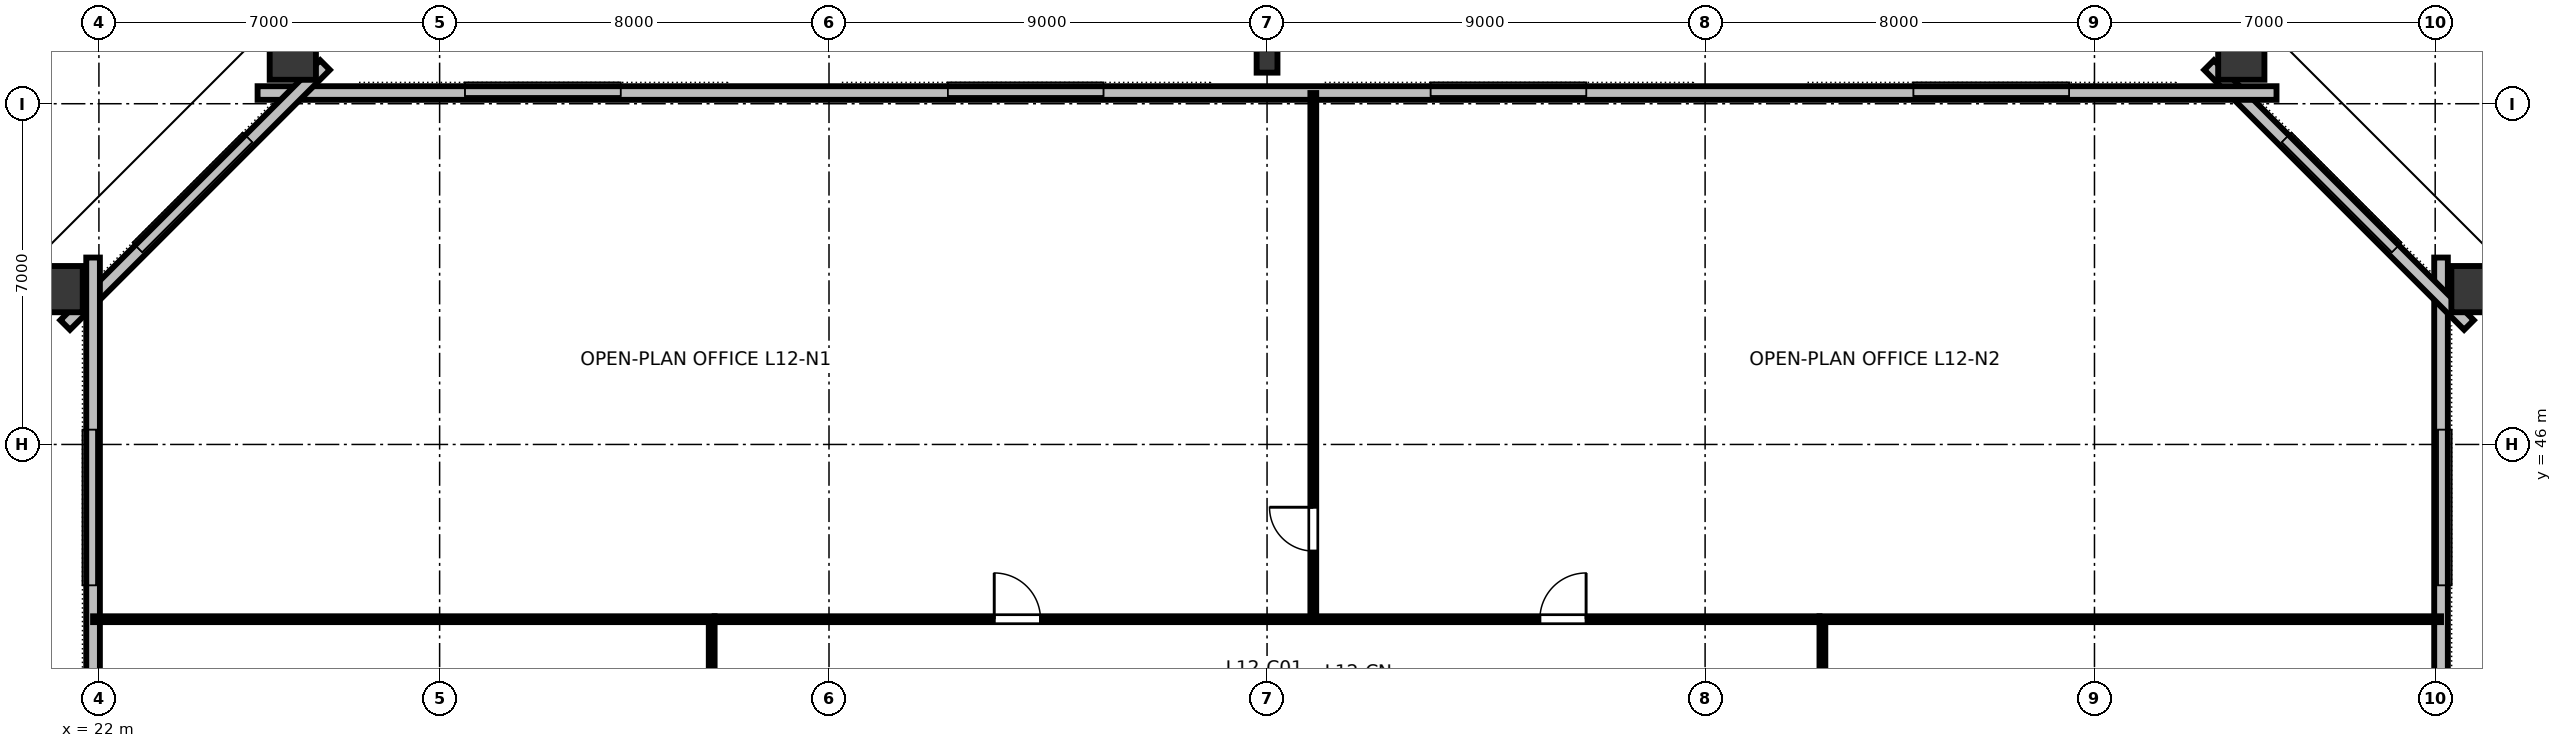
"""IFC4 building model, lengths in metres.
Left out: names, types, materials, properties, quantities, classifications, styles, units other than length and angle.
Written with IfcOpenShell. Run it as: python <this file> out.ifc"""

import sys

from ifc_helpers import new_model, si_unit, direction, frame, frame_2d, origin, origin_2d, place, context, subcontext, project, spatial, rectangle, hollow_rectangle, i_section, extrude, element, fill, save


model = new_model("IFC4")
c1 = context("Model", 3, precision=1e-05, world=origin(), true_north=direction((0.0, 1.0)))
c2 = subcontext(c1, "Body", "Model", "MODEL_VIEW")
j1 = project(units=[si_unit("LENGTHUNIT", "METRE"), si_unit("PLANEANGLEUNIT", "RADIAN")], contexts=[c1])
p1 = place(None, origin())
s1 = spatial("IfcSite", under=j1, at=p1, CompositionType="ELEMENT")
p2 = place(p1, origin())
s2 = spatial("IfcBuilding", under=s1, at=p2, CompositionType="ELEMENT")
p3 = place(p2, frame((0.0, 0.0, 49.6)))
s3 = spatial("IfcBuildingStorey", under=s2, at=p3, CompositionType="ELEMENT", Elevation=49.6)
for number, where, z_axis, x_axis in (
    (1, (70.907, 49.191, 0.0), (0.0, 0.0, 1.0), (0.0, 1.0, 0.0)),
    (2, (66.016, 54.067, 0.0), (0.0, 0.0, 1.0), (1.0, 0.0, 0.0)),
):
    element("IfcColumn", number, at=place(p3, frame(where, z_axis=z_axis, x_axis=x_axis)), inside=s3, PredefinedType="COLUMN", context=c2, shape_type="SweptSolid", body=[
        extrude(hollow_rectangle(XDim=0.95, YDim=1.15, WallThickness=0.06, at=origin_2d()), origin(), (0.0, 0.0, 1.0), 3.358),
    ])
p4 = place(p3, frame((46.0, 53.88, 0.0), z_axis=(0.0, 0.0, 1.0), x_axis=(1.0, 0.0, 0.0)))
e3 = element("IfcColumn", 3, at=p4, inside=s3, PredefinedType="COLUMN", context=c2, shape_type="SweptSolid", body=[
    extrude(i_section(OverallWidth=0.428, OverallDepth=0.483, WebThickness=0.051, FlangeThickness=0.082, FilletRadius=0.025, at=origin_2d()), origin(), (0.0, 0.0, 1.0), 3.358),
])
for number, where, z_axis, x_axis in (
    (4, (25.984, 54.067, 0.0), (0.0, 0.0, 1.0), (1.0, 0.0, 0.0)),
    (5, (21.093, 49.191, 0.0), (0.0, 0.0, 1.0), (0.0, 1.0, 0.0)),
):
    element("IfcColumn", number, at=place(p3, frame(where, z_axis=z_axis, x_axis=x_axis)), inside=s3, PredefinedType="COLUMN", context=c2, shape_type="SweptSolid", body=[
        extrude(hollow_rectangle(XDim=0.95, YDim=1.15, WallThickness=0.06, at=origin_2d()), origin(), (0.0, 0.0, 1.0), 3.358),
    ])
p5 = place(p3, frame((70.12, 14.16, 0.0), z_axis=(0.0, 0.0, 1.0), x_axis=(0.0, 1.0, 0.0)))
e6 = element("IfcWall", 6, at=p5, inside=s3, PredefinedType="STANDARD", context=c2, shape_type="SweptSolid", body=[
    extrude(rectangle(XDim=35.68, YDim=0.28, at=frame_2d((17.84, 0.0))), origin(), (0.0, 0.0, 1.0), 3.36),
])
p6 = place(p3, frame((70.694, 48.455, 0.0), z_axis=(0.0, 0.0, 1.0), x_axis=(-0.707106781187, 0.707106781187, 0.0)))
e7 = element("IfcWall", 7, at=p6, inside=s3, PredefinedType="STANDARD", context=c2, shape_type="SweptSolid", body=[
    extrude(rectangle(XDim=7.551, YDim=0.28, at=frame_2d((3.775, 0.0))), origin(), (0.0, 0.0, 1.0), 3.36),
])
p7 = place(p3, frame((66.74, 53.22, 0.0), z_axis=(0.0, 0.0, 1.0), x_axis=(-1.0, 0.0, 0.0)))
e8 = element("IfcWall", 8, at=p7, inside=s3, PredefinedType="STANDARD", context=c2, shape_type="SweptSolid", body=[
    extrude(rectangle(XDim=41.48, YDim=0.28, at=frame_2d((20.74, 0.0))), origin(), (0.0, 0.0, 1.0), 3.36),
])
p8 = place(p3, frame((26.646, 53.794, 0.0), z_axis=(0.0, 0.0, 1.0), x_axis=(-0.707106781187, -0.707106781187, 0.0)))
e9 = element("IfcWall", 9, at=p8, inside=s3, PredefinedType="STANDARD", context=c2, shape_type="SweptSolid", body=[
    extrude(rectangle(XDim=7.551, YDim=0.28, at=frame_2d((3.775, 0.0))), origin(), (0.0, 0.0, 1.0), 3.36),
])
p9 = place(p3, frame((21.88, 49.84, 0.0), z_axis=(0.0, 0.0, 1.0), x_axis=(0.0, -1.0, 0.0)))
e10 = element("IfcWall", 10, at=p9, inside=s3, PredefinedType="STANDARD", context=c2, shape_type="SweptSolid", body=[
    extrude(rectangle(XDim=35.68, YDim=0.28, at=frame_2d((17.84, 0.0))), origin(), (0.0, 0.0, 1.0), 3.36),
])
p10 = place(p3, frame((46.95, 42.41, 0.0), z_axis=(0.0, 0.0, 1.0), x_axis=(0.0, 1.0, 0.0)))
e11 = element("IfcWall", 11, at=p10, inside=s3, PredefinedType="PARTITIONING", context=c2, shape_type="SweptSolid", body=[
    extrude(rectangle(XDim=10.81, YDim=0.12, at=frame_2d((5.405, 0.0))), origin(), (0.0, 0.0, 1.0), 2.64),
])
p11 = place(p10, frame((1.4, 0.0, 0.0)))
e12 = element("IfcOpeningElement", 12, at=p11, cuts=e11, PredefinedType="OPENING", context=c2, shape_type="SweptSolid", body=[
    extrude(rectangle(XDim=0.9, YDim=2.15, at=frame_2d((0.45, 1.075))), frame((0.0, 0.07, 0.0), z_axis=(0.0, -1.0, 0.0), x_axis=(1.0, 0.0, 0.0)), (0.0, 0.0, 1.0), 0.14),
])
p12 = place(p3, frame((34.65, 42.41, 0.0), z_axis=(0.0, 0.0, 1.0), x_axis=(1.0, 0.0, 0.0)))
e13 = element("IfcWall", 13, at=p12, inside=s3, PredefinedType="PARTITIONING", context=c2, shape_type="SweptSolid", body=[
    extrude(rectangle(XDim=22.7, YDim=0.12, at=frame_2d((11.35, 0.0))), origin(), (0.0, 0.0, 1.0), 2.64),
])
p13 = place(p12, frame((5.745, 0.0, 0.0)))
e14 = element("IfcOpeningElement", 14, at=p13, cuts=e13, PredefinedType="OPENING", context=c2, shape_type="SweptSolid", body=[
    extrude(rectangle(XDim=0.95, YDim=2.15, at=frame_2d((0.475, 1.075))), frame((0.0, 0.07, 0.0), z_axis=(0.0, -1.0, 0.0), x_axis=(1.0, 0.0, 0.0)), (0.0, 0.0, 1.0), 0.14),
])
p14 = place(p12, frame((16.955, 0.0, 0.0)))
e15 = element("IfcOpeningElement", 15, at=p14, cuts=e13, PredefinedType="OPENING", context=c2, shape_type="SweptSolid", body=[
    extrude(rectangle(XDim=0.95, YDim=2.15, at=frame_2d((0.475, 1.075))), frame((0.0, 0.07, 0.0), z_axis=(0.0, -1.0, 0.0), x_axis=(1.0, 0.0, 0.0)), (0.0, 0.0, 1.0), 0.14),
])
p15 = place(p3, frame((34.59, 21.65, 0.0), z_axis=(0.0, 0.0, 1.0), x_axis=(0.0, 1.0, 0.0)))
e16 = element("IfcWall", 16, at=p15, inside=s3, PredefinedType="PARTITIONING", context=c2, shape_type="SweptSolid", body=[
    extrude(rectangle(XDim=20.7, YDim=0.12, at=frame_2d((10.35, 0.0))), origin(), (0.0, 0.0, 1.0), 2.64),
])
p16 = place(p15, frame((9.875, 0.0, 0.0)))
e17 = element("IfcOpeningElement", 17, at=p16, cuts=e16, PredefinedType="OPENING", context=c2, shape_type="SweptSolid", body=[
    extrude(rectangle(XDim=0.95, YDim=2.15, at=frame_2d((0.475, 1.075))), frame((0.0, 0.07, 0.0), z_axis=(0.0, -1.0, 0.0), x_axis=(1.0, 0.0, 0.0)), (0.0, 0.0, 1.0), 0.14),
])
p17 = place(p3, frame((57.41, 21.65, 0.0), z_axis=(0.0, 0.0, 1.0), x_axis=(0.0, 1.0, 0.0)))
e18 = element("IfcWall", 18, at=p17, inside=s3, PredefinedType="PARTITIONING", context=c2, shape_type="SweptSolid", body=[
    extrude(rectangle(XDim=20.7, YDim=0.12, at=frame_2d((10.35, 0.0))), origin(), (0.0, 0.0, 1.0), 2.64),
])
p18 = place(p17, frame((5.479, 0.0, 0.0)))
e19 = element("IfcOpeningElement", 19, at=p18, cuts=e18, PredefinedType="OPENING", context=c2, shape_type="SweptSolid", body=[
    extrude(rectangle(XDim=0.95, YDim=2.15, at=frame_2d((0.475, 1.075))), frame((0.0, 0.07, 0.0), z_axis=(0.0, -1.0, 0.0), x_axis=(1.0, 0.0, 0.0)), (0.0, 0.0, 1.0), 0.14),
])
p19 = place(p17, frame((15.629, 0.0, 0.0)))
e20 = element("IfcOpeningElement", 20, at=p19, cuts=e18, PredefinedType="OPENING", context=c2, shape_type="SweptSolid", body=[
    extrude(rectangle(XDim=0.95, YDim=2.15, at=frame_2d((0.475, 1.075))), frame((0.0, 0.07, 0.0), z_axis=(0.0, -1.0, 0.0), x_axis=(1.0, 0.0, 0.0)), (0.0, 0.0, 1.0), 0.14),
])
for number, where, z_axis, x_axis in (
    (21, (34.65, 42.41, 0.0), (0.0, 0.0, 1.0), (-1.0, 0.0, 0.0)),
    (22, (57.35, 42.41, 0.0), (0.0, 0.0, 1.0), (1.0, 0.0, 0.0)),
):
    element("IfcWall", number, at=place(p3, frame(where, z_axis=z_axis, x_axis=x_axis)), inside=s3, PredefinedType="PARTITIONING", context=c2, shape_type="SweptSolid", body=[
        extrude(rectangle(XDim=12.77, YDim=0.12, at=frame_2d((6.385, 0.0))), origin(), (0.0, 0.0, 1.0), 2.64),
    ])
p20 = place(p11, origin())
e23 = element("IfcDoor", 23, at=p20, inside=s3, OperationType="SINGLE_SWING_RIGHT", PredefinedType="DOOR", context=c2, shape_type="SweptSolid", body=[
    extrude(rectangle(XDim=0.9, YDim=2.15, at=frame_2d((0.45, 1.075))), frame((0.0, 0.025, 0.0), z_axis=(0.0, -1.0, 0.0), x_axis=(1.0, 0.0, 0.0)), (0.0, 0.0, 1.0), 0.05),
])
fill(e12, e23)
p21 = place(p13, origin())
e24 = element("IfcDoor", 24, at=p21, inside=s3, OperationType="SINGLE_SWING_LEFT", PredefinedType="DOOR", context=c2, shape_type="SweptSolid", body=[
    extrude(rectangle(XDim=0.95, YDim=2.15, at=frame_2d((0.475, 1.075))), frame((0.0, 0.025, 0.0), z_axis=(0.0, -1.0, 0.0), x_axis=(1.0, 0.0, 0.0)), (0.0, 0.0, 1.0), 0.05),
])
fill(e14, e24)
p22 = place(p14, origin())
e25 = element("IfcDoor", 25, at=p22, inside=s3, OperationType="SINGLE_SWING_RIGHT", PredefinedType="DOOR", context=c2, shape_type="SweptSolid", body=[
    extrude(rectangle(XDim=0.95, YDim=2.15, at=frame_2d((0.475, 1.075))), frame((0.0, 0.025, 0.0), z_axis=(0.0, -1.0, 0.0), x_axis=(1.0, 0.0, 0.0)), (0.0, 0.0, 1.0), 0.05),
])
fill(e15, e25)
save(model, sys.argv[1])
